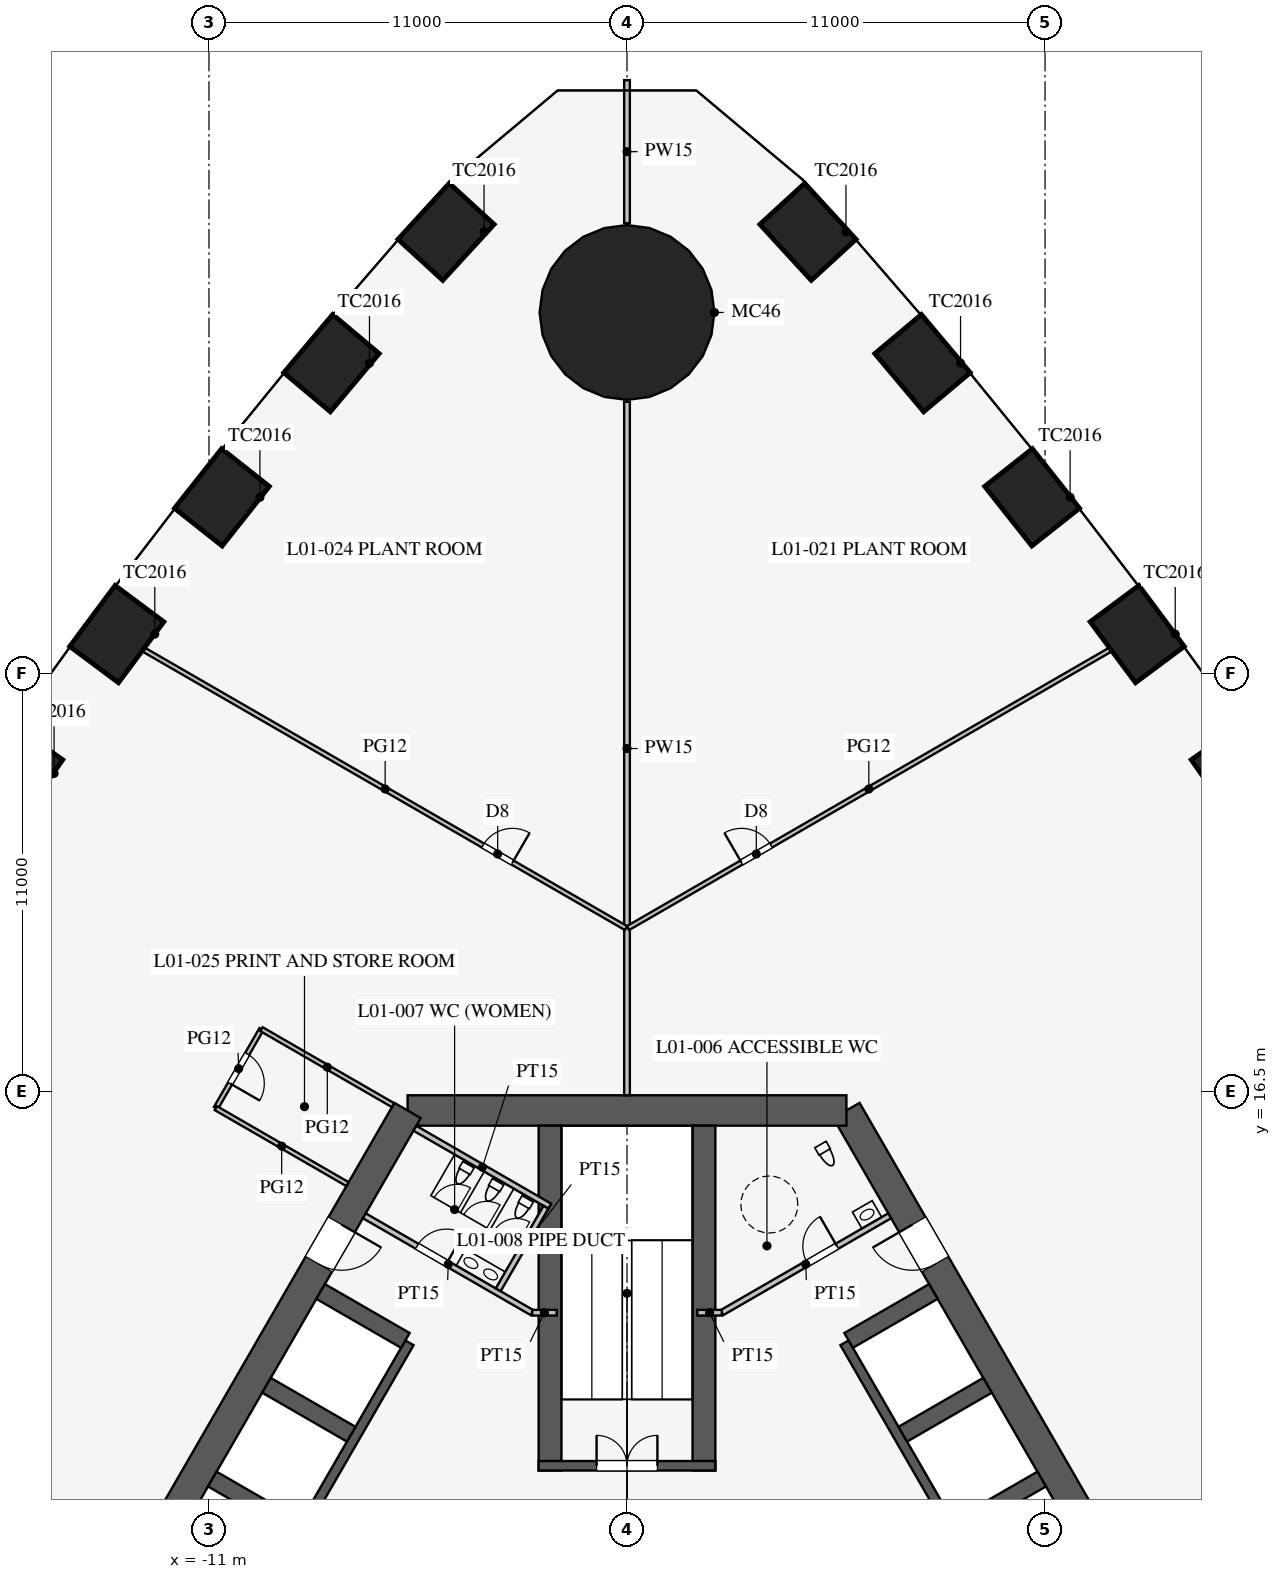
"""IFC4 building model, lengths in metres.
Left out: names, types, materials, properties, quantities, classifications, styles, units other than length and angle.
Written with IfcOpenShell. Run it as: python <this file> out.ifc"""

import sys

from ifc_helpers import new_model, si_unit, direction, frame, frame_2d, origin, origin_2d, place, context, subcontext, project, spatial, rectangle, circle, extrude, element, fill, save


model = new_model("IFC4")
c1 = context("Model", 3, precision=1e-05, world=origin(), true_north=direction((0.0, 1.0)))
c2 = subcontext(c1, "Body", "Model", "MODEL_VIEW")
j1 = project(units=[si_unit("LENGTHUNIT", "METRE"), si_unit("PLANEANGLEUNIT", "RADIAN")], contexts=[c1])
p1 = place(None, origin())
s1 = spatial("IfcSite", under=j1, at=p1, CompositionType="ELEMENT")
p2 = place(p1, origin())
s2 = spatial("IfcBuilding", under=s1, at=p2, CompositionType="ELEMENT")
p3 = place(p2, frame((0.0, 0.0, 6.5)))
s3 = spatial("IfcBuildingStorey", under=s2, at=p3, CompositionType="ELEMENT", Elevation=6.5)
for number, where, z_axis, x_axis in (
    (1, (16.076, 24.87, 0.0), (0.0, 0.0, 1.0), (-0.574, 0.819, 0.0)),
    (2, (13.426, 28.536, 0.0), (0.0, 0.0, 1.0), (-0.597, 0.802, 0.0)),
    (3, (10.66, 32.135, 0.0), (0.0, 0.0, 1.0), (-0.62, 0.784, 0.0)),
    (4, (7.776, 35.667, 0.0), (0.0, 0.0, 1.0), (-0.643, 0.766, 0.0)),
    (5, (4.762, 39.122, 0.0), (0.0, 0.0, 1.0), (-0.676, 0.737, 0.0)),
    (6, (-4.762, 39.122, 0.0), (0.0, 0.0, 1.0), (-0.676, -0.737, 0.0)),
    (7, (-7.776, 35.667, 0.0), (0.0, 0.0, 1.0), (-0.643, -0.766, 0.0)),
    (8, (-10.66, 32.135, 0.0), (0.0, 0.0, 1.0), (-0.62, -0.784, 0.0)),
    (9, (-13.426, 28.536, 0.0), (0.0, 0.0, 1.0), (-0.597, -0.802, 0.0)),
    (10, (-16.076, 24.87, 0.0), (0.0, 0.0, 1.0), (-0.574, -0.819, 0.0)),
):
    element("IfcColumn", number, at=place(p3, frame(where, z_axis=z_axis, x_axis=x_axis)), inside=s3, PredefinedType="COLUMN", context=c2, shape_type="SweptSolid", body=[
        extrude(rectangle(XDim=2.0, YDim=1.6, at=origin_2d()), origin(), (0.0, 0.0, 1.0), 5.0),
    ])
p4 = place(p3, frame((0.0, 37.0, 0.0), z_axis=(0.0, 0.0, 1.0), x_axis=(1.0, 0.0, 0.0)))
e11 = element("IfcColumn", 11, at=p4, inside=s3, PredefinedType="COLUMN", context=c2, shape_type="SweptSolid", body=[
    extrude(circle(Radius=2.3, at=origin_2d()), origin(), (0.0, 0.0, 1.0), 5.0),
])
p5 = place(p3, frame((16.743, -3.0, 0.0), z_axis=(0.0, 0.0, 1.0), x_axis=(-0.500002442456, 0.866023993627, 0.0)))
e12 = element("IfcWall", 12, at=p5, inside=s3, PredefinedType="SHEAR", context=c2, shape_type="SweptSolid", body=[
    extrude(rectangle(XDim=21.939, YDim=0.8, at=frame_2d((10.97, 0.0))), origin(), (0.0, 0.0, 1.0), 5.0),
])
p6 = place(p5, frame((17.27, 0.0, 0.0)))
e13 = element("IfcOpeningElement", 13, at=p6, cuts=e12, PredefinedType="OPENING", context=c2, shape_type="SweptSolid", body=[
    extrude(rectangle(XDim=1.2, YDim=2.1, at=frame_2d((0.6, 1.05))), frame((0.0, 0.41, 0.0), z_axis=(0.0, -1.0, 0.0), x_axis=(1.0, 0.0, 0.0)), (0.0, 0.0, 1.0), 0.82),
])
p7 = place(p5, frame((3.47, 0.0, 0.0)))
e14 = element("IfcOpeningElement", 14, at=p7, cuts=e12, PredefinedType="OPENING", context=c2, shape_type="SweptSolid", body=[
    extrude(rectangle(XDim=1.2, YDim=2.1, at=frame_2d((0.6, 1.05))), frame((0.0, 0.41, 0.0), z_axis=(0.0, -1.0, 0.0), x_axis=(1.0, 0.0, 0.0)), (0.0, 0.0, 1.0), 0.82),
])
p8 = place(p3, frame((5.773, 16.0, 0.0), z_axis=(0.0, 0.0, 1.0), x_axis=(-1.0, 0.0, 0.0)))
e15 = element("IfcWall", 15, at=p8, inside=s3, PredefinedType="SHEAR", context=c2, shape_type="SweptSolid", body=[
    extrude(rectangle(XDim=11.547, YDim=0.8, at=frame_2d((5.773, 0.0))), origin(), (0.0, 0.0, 1.0), 5.0),
])
p9 = place(p3, frame((-5.773, 16.0, 0.0), z_axis=(0.0, 0.0, 1.0), x_axis=(-0.500002442456, -0.866023993627, 0.0)))
e16 = element("IfcWall", 16, at=p9, inside=s3, PredefinedType="SHEAR", context=c2, shape_type="SweptSolid", body=[
    extrude(rectangle(XDim=21.939, YDim=0.8, at=frame_2d((10.97, 0.0))), origin(), (0.0, 0.0, 1.0), 5.0),
])
p10 = place(p9, frame((17.27, 0.0, 0.0)))
e17 = element("IfcOpeningElement", 17, at=p10, cuts=e16, PredefinedType="OPENING", context=c2, shape_type="SweptSolid", body=[
    extrude(rectangle(XDim=1.2, YDim=2.1, at=frame_2d((0.6, 1.05))), frame((0.0, 0.41, 0.0), z_axis=(0.0, -1.0, 0.0), x_axis=(1.0, 0.0, 0.0)), (0.0, 0.0, 1.0), 0.82),
])
p11 = place(p9, frame((3.47, 0.0, 0.0)))
e18 = element("IfcOpeningElement", 18, at=p11, cuts=e16, PredefinedType="OPENING", context=c2, shape_type="SweptSolid", body=[
    extrude(rectangle(XDim=1.2, YDim=2.1, at=frame_2d((0.6, 1.05))), frame((0.0, 0.41, 0.0), z_axis=(0.0, -1.0, 0.0), x_axis=(1.0, 0.0, 0.0)), (0.0, 0.0, 1.0), 0.82),
])
p12 = place(p3, frame((11.424, 0.014, 0.0), z_axis=(0.0, 0.0, 1.0), x_axis=(-0.500001763848, 0.866024385424, 0.0)))
e19 = element("IfcWall", 19, at=p12, inside=s3, PredefinedType="SHEAR", context=c2, shape_type="SweptSolid", body=[
    extrude(rectangle(XDim=11.4, YDim=0.25, at=frame_2d((5.7, 0.0))), origin(), (0.0, 0.0, 1.0), 5.0),
])
for number, where, z_axis, x_axis in (
    (20, (8.682, 5.012, 0.0), (0.0, 0.0, 1.0), (0.866, 0.5, 0.0)),
    (21, (7.257, 7.481, 0.0), (0.0, 0.0, 1.0), (0.866, 0.5, 0.0)),
):
    element("IfcWall", number, at=place(p3, frame(where, z_axis=z_axis, x_axis=x_axis)), inside=s3, PredefinedType="SHEAR", context=c2, shape_type="SweptSolid", body=[
        extrude(rectangle(XDim=2.575, YDim=0.45, at=frame_2d((1.288, 0.0))), origin(), (0.0, 0.0, 1.0), 5.0),
    ])
p13 = place(p3, frame((5.832, 9.949, 0.0), z_axis=(0.0, 0.0, 1.0), x_axis=(0.866029291668, 0.499993265928, 0.0)))
e22 = element("IfcWall", 22, at=p13, inside=s3, PredefinedType="SHEAR", context=c2, shape_type="SweptSolid", body=[
    extrude(rectangle(XDim=2.575, YDim=0.45, at=frame_2d((1.288, 0.0))), origin(), (0.0, 0.0, 1.0), 5.0),
])
p14 = place(p3, frame((-5.724, 9.886, 0.0), z_axis=(0.0, 0.0, 1.0), x_axis=(-0.500001763848, -0.866024385424, 0.0)))
e23 = element("IfcWall", 23, at=p14, inside=s3, PredefinedType="SHEAR", context=c2, shape_type="SweptSolid", body=[
    extrude(rectangle(XDim=11.4, YDim=0.25, at=frame_2d((5.7, 0.0))), origin(), (0.0, 0.0, 1.0), 5.0),
])
p15 = place(p14, frame((6.525, 0.0, 0.0)))
e24 = element("IfcOpeningElement", 24, at=p15, cuts=e23, PredefinedType="OPENING", context=c2, shape_type="SweptSolid", body=[
    extrude(rectangle(XDim=1.2, YDim=2.2, at=frame_2d((0.6, 1.1))), frame((0.0, 0.135, 0.0), z_axis=(0.0, -1.0, 0.0), x_axis=(1.0, 0.0, 0.0)), (0.0, 0.0, 1.0), 0.27),
])
p16 = place(p14, frame((9.375, 0.0, 0.0)))
e25 = element("IfcOpeningElement", 25, at=p16, cuts=e23, PredefinedType="OPENING", context=c2, shape_type="SweptSolid", body=[
    extrude(rectangle(XDim=1.2, YDim=2.2, at=frame_2d((0.6, 1.1))), frame((0.0, 0.135, 0.0), z_axis=(0.0, -1.0, 0.0), x_axis=(1.0, 0.0, 0.0)), (0.0, 0.0, 1.0), 0.27),
])
p17 = place(p3, frame((-5.832, 9.949, 0.0), z_axis=(0.0, 0.0, 1.0), x_axis=(-0.866029291668, 0.499993265928, 0.0)))
e26 = element("IfcWall", 26, at=p17, inside=s3, PredefinedType="SHEAR", context=c2, shape_type="SweptSolid", body=[
    extrude(rectangle(XDim=2.575, YDim=0.45, at=frame_2d((1.288, 0.0))), origin(), (0.0, 0.0, 1.0), 5.0),
])
for number, where, z_axis, x_axis in (
    (27, (-7.257, 7.481, 0.0), (0.0, 0.0, 1.0), (-0.866, 0.5, 0.0)),
    (28, (-8.682, 5.012, 0.0), (0.0, 0.0, 1.0), (-0.866, 0.5, 0.0)),
):
    element("IfcWall", number, at=place(p3, frame(where, z_axis=z_axis, x_axis=x_axis)), inside=s3, PredefinedType="SHEAR", context=c2, shape_type="SweptSolid", body=[
        extrude(rectangle(XDim=2.575, YDim=0.45, at=frame_2d((1.288, 0.0))), origin(), (0.0, 0.0, 1.0), 5.0),
    ])
for number, where, z_axis, x_axis in (
    (29, (2.025, 6.525, 0.0), (0.0, 0.0, 1.0), (0.0, 1.0, 0.0)),
    (30, (-2.025, 6.525, 0.0), (0.0, 0.0, 1.0), (0.0, 1.0, 0.0)),
):
    element("IfcWall", number, at=place(p3, frame(where, z_axis=z_axis, x_axis=x_axis)), inside=s3, PredefinedType="SHEAR", context=c2, shape_type="SweptSolid", body=[
        extrude(rectangle(XDim=9.075, YDim=0.6, at=frame_2d((4.538, 0.0))), origin(), (0.0, 0.0, 1.0), 5.0),
    ])
p18 = place(p3, frame((2.325, 6.65, 0.0), z_axis=(0.0, 0.0, 1.0), x_axis=(-1.0, 0.0, 0.0)))
e31 = element("IfcWall", 31, at=p18, inside=s3, PredefinedType="SHEAR", context=c2, shape_type="SweptSolid", body=[
    extrude(rectangle(XDim=4.65, YDim=0.25, at=frame_2d((2.325, 0.0))), origin(), (0.0, 0.0, 1.0), 5.0),
])
p19 = place(p18, frame((1.525, 0.0, 0.0)))
e32 = element("IfcOpeningElement", 32, at=p19, cuts=e31, PredefinedType="OPENING", context=c2, shape_type="SweptSolid", body=[
    extrude(rectangle(XDim=1.6, YDim=2.1, at=frame_2d((0.8, 1.05))), frame((0.0, 0.135, 0.0), z_axis=(0.0, -1.0, 0.0), x_axis=(1.0, 0.0, 0.0)), (0.0, 0.0, 1.0), 0.27),
])
p20 = place(p3, frame((2.495, 10.678, 0.0), z_axis=(0.0, 0.0, 1.0), x_axis=(0.86602216432, 0.500005610874, 0.0)))
e33 = element("IfcWall", 33, at=p20, inside=s3, PredefinedType="PARTITIONING", context=c2, shape_type="SweptSolid", body=[
    extrude(rectangle(XDim=5.1, YDim=0.15, at=frame_2d((2.55, 0.0))), origin(), (0.0, 0.0, 1.0), 4.8),
])
p21 = place(p20, frame((2.6, 0.0, 0.0)))
e34 = element("IfcOpeningElement", 34, at=p21, cuts=e33, PredefinedType="OPENING", context=c2, shape_type="SweptSolid", body=[
    extrude(rectangle(XDim=0.9, YDim=2.1, at=frame_2d((0.45, 1.05))), frame((0.0, 0.085, 0.0), z_axis=(0.0, -1.0, 0.0), x_axis=(1.0, 0.0, 0.0)), (0.0, 0.0, 1.0), 0.17),
])
p22 = place(p3, frame((-2.495, 10.678, 0.0), z_axis=(0.0, 0.0, 1.0), x_axis=(-0.86602216432, 0.500005610874, 0.0)))
e35 = element("IfcWall", 35, at=p22, inside=s3, PredefinedType="PARTITIONING", context=c2, shape_type="SweptSolid", body=[
    extrude(rectangle(XDim=5.1, YDim=0.15, at=frame_2d((2.55, 0.0))), origin(), (0.0, 0.0, 1.0), 4.8),
])
p23 = place(p22, frame((2.6, 0.0, 0.0)))
e36 = element("IfcOpeningElement", 36, at=p23, cuts=e35, PredefinedType="OPENING", context=c2, shape_type="SweptSolid", body=[
    extrude(rectangle(XDim=0.9, YDim=2.1, at=frame_2d((0.45, 1.05))), frame((0.0, 0.085, 0.0), z_axis=(0.0, -1.0, 0.0), x_axis=(1.0, 0.0, 0.0)), (0.0, 0.0, 1.0), 0.17),
])
for number, where, z_axis, x_axis in (
    (37, (2.495, 10.678, 0.0), (0.0, 0.0, 1.0), (-1.0, 0.0, 0.0)),
    (38, (-2.495, 10.678, 0.0), (0.0, 0.0, 1.0), (1.0, 0.0, 0.0)),
):
    element("IfcWall", number, at=place(p3, frame(where, z_axis=z_axis, x_axis=x_axis)), inside=s3, PredefinedType="PARTITIONING", context=c2, shape_type="SweptSolid", body=[
        extrude(rectangle(XDim=0.645, YDim=0.15, at=frame_2d((0.323, 0.0))), origin(), (0.0, 0.0, 1.0), 4.8),
    ])
p24 = place(p3, frame((-2.031, 13.482, 0.0), z_axis=(0.0, 0.0, 1.0), x_axis=(-0.866050731258, 0.499956128963, 0.0)))
e39 = element("IfcWall", 39, at=p24, inside=s3, PredefinedType="PARTITIONING", context=c2, shape_type="SweptSolid", body=[
    extrude(rectangle(XDim=4.1, YDim=0.15, at=frame_2d((2.05, 0.0))), origin(), (0.0, 0.0, 1.0), 4.8),
])
p25 = place(p3, frame((-3.389, 11.281, 0.0), z_axis=(0.0, 0.0, 1.0), x_axis=(0.499989096993, 0.866031698547, 0.0)))
e40 = element("IfcWall", 40, at=p25, inside=s3, PredefinedType="PARTITIONING", context=c2, shape_type="SweptSolid", body=[
    extrude(rectangle(XDim=2.51, YDim=0.15, at=frame_2d((1.255, 0.0))), origin(), (0.0, 0.0, 1.0), 4.8),
])
p26 = place(p3, frame((0.0, 16.4, 0.0), z_axis=(0.0, 0.0, 1.0), x_axis=(0.0, 1.0, 0.0)))
e41 = element("IfcWall", 41, at=p26, inside=s3, PredefinedType="PARTITIONING", context=c2, shape_type="SweptSolid", body=[
    extrude(rectangle(XDim=18.25, YDim=0.15, at=frame_2d((9.125, 0.0))), origin(), (0.0, 0.0, 1.0), 3.1),
])
p27 = place(p3, frame((0.0, 39.35, 0.0), z_axis=(0.0, 0.0, 1.0), x_axis=(0.0, 1.0, 0.0)))
e42 = element("IfcWall", 42, at=p27, inside=s3, PredefinedType="PARTITIONING", context=c2, shape_type="SweptSolid", body=[
    extrude(rectangle(XDim=3.764, YDim=0.15, at=frame_2d((1.882, 0.0))), origin(), (0.0, 0.0, 1.0), 3.1),
])
p28 = place(p3, frame((0.025, 20.799, 0.0), z_axis=(0.0, 0.0, 1.0), x_axis=(0.866024773507, 0.50000109167, 0.0)))
e43 = element("IfcWall", 43, at=p28, inside=s3, PredefinedType="PARTITIONING", context=c2, shape_type="SweptSolid", body=[
    extrude(rectangle(XDim=14.638, YDim=0.12, at=frame_2d((7.319, 0.0))), origin(), (0.0, 0.0, 1.0), 3.6),
])
p29 = place(p28, frame((3.45, 0.0, 0.0)))
e44 = element("IfcOpeningElement", 44, at=p29, cuts=e43, PredefinedType="OPENING", context=c2, shape_type="SweptSolid", body=[
    extrude(rectangle(XDim=0.9, YDim=2.1, at=frame_2d((0.45, 1.05))), frame((0.0, 0.07, 0.0), z_axis=(0.0, -1.0, 0.0), x_axis=(1.0, 0.0, 0.0)), (0.0, 0.0, 1.0), 0.14),
])
p30 = place(p3, frame((-9.619, 18.14, 0.0), z_axis=(0.0, 0.0, 1.0), x_axis=(-0.500001309137, -0.866024647952, 0.0)))
e45 = element("IfcWall", 45, at=p30, inside=s3, PredefinedType="PARTITIONING", context=c2, shape_type="SweptSolid", body=[
    extrude(rectangle(XDim=2.4, YDim=0.12, at=frame_2d((1.2, 0.0))), origin(), (0.0, 0.0, 1.0), 3.6),
])
p31 = place(p30, frame((0.75, 0.0, 0.0)))
e46 = element("IfcOpeningElement", 46, at=p31, cuts=e45, PredefinedType="OPENING", context=c2, shape_type="SweptSolid", body=[
    extrude(rectangle(XDim=0.9, YDim=2.1, at=frame_2d((0.45, 1.05))), frame((0.0, 0.07, 0.0), z_axis=(0.0, -1.0, 0.0), x_axis=(1.0, 0.0, 0.0)), (0.0, 0.0, 1.0), 0.14),
])
for number, where, z_axis, x_axis in (
    (47, (-6.155, 16.14, 0.0), (0.0, 0.0, 1.0), (-0.866, 0.5, 0.0)),
    (48, (-7.355, 14.061, 0.0), (0.0, 0.0, 1.0), (-0.866, 0.5, 0.0)),
):
    element("IfcWall", number, at=place(p3, frame(where, z_axis=z_axis, x_axis=x_axis)), inside=s3, PredefinedType="PARTITIONING", context=c2, shape_type="SweptSolid", body=[
        extrude(rectangle(XDim=4.0, YDim=0.12, at=frame_2d((2.0, 0.0))), origin(), (0.0, 0.0, 1.0), 3.6),
    ])
p32 = place(p3, frame((-0.025, 20.799, 0.0), z_axis=(0.0, 0.0, 1.0), x_axis=(-0.866024773507, 0.50000109167, 0.0)))
e49 = element("IfcWall", 49, at=p32, inside=s3, PredefinedType="PARTITIONING", context=c2, shape_type="SweptSolid", body=[
    extrude(rectangle(XDim=14.638, YDim=0.12, at=frame_2d((7.319, 0.0))), origin(), (0.0, 0.0, 1.0), 3.6),
])
p33 = place(p32, frame((3.45, 0.0, 0.0)))
e50 = element("IfcOpeningElement", 50, at=p33, cuts=e49, PredefinedType="OPENING", context=c2, shape_type="SweptSolid", body=[
    extrude(rectangle(XDim=0.9, YDim=2.1, at=frame_2d((0.45, 1.05))), frame((0.0, 0.07, 0.0), z_axis=(0.0, -1.0, 0.0), x_axis=(1.0, 0.0, 0.0)), (0.0, 0.0, 1.0), 0.14),
])
p34 = place(p21, origin())
e51 = element("IfcDoor", 51, at=p34, inside=s3, OperationType="SINGLE_SWING_RIGHT", PredefinedType="DOOR", context=c2, shape_type="SweptSolid", body=[
    extrude(rectangle(XDim=0.9, YDim=2.1, at=frame_2d((0.45, 1.05))), frame((0.0, 0.025, 0.0), z_axis=(0.0, -1.0, 0.0), x_axis=(1.0, 0.0, 0.0)), (0.0, 0.0, 1.0), 0.05),
])
fill(e34, e51)
p35 = place(p23, frame((0.9, 0.0, 0.0), z_axis=(0.0, 0.0, 1.0), x_axis=(-1.0, 0.0, 0.0)))
e52 = element("IfcDoor", 52, at=p35, inside=s3, OperationType="SINGLE_SWING_RIGHT", PredefinedType="DOOR", context=c2, shape_type="SweptSolid", body=[
    extrude(rectangle(XDim=0.9, YDim=2.1, at=frame_2d((0.45, 1.05))), frame((0.0, 0.025, 0.0), z_axis=(0.0, -1.0, 0.0), x_axis=(1.0, 0.0, 0.0)), (0.0, 0.0, 1.0), 0.05),
])
fill(e36, e52)
p36 = place(p19, frame((1.6, 0.0, 0.0), z_axis=(0.0, 0.0, 1.0), x_axis=(-1.0, 0.0, 0.0)))
e53 = element("IfcDoor", 53, at=p36, inside=s3, OperationType="DOUBLE_DOOR_SINGLE_SWING", PredefinedType="DOOR", context=c2, shape_type="SweptSolid", body=[
    extrude(rectangle(XDim=1.6, YDim=2.1, at=frame_2d((0.8, 1.05))), frame((0.0, 0.025, 0.0), z_axis=(0.0, -1.0, 0.0), x_axis=(1.0, 0.0, 0.0)), (0.0, 0.0, 1.0), 0.05),
])
fill(e32, e53)
p37 = place(p6, origin())
e54 = element("IfcDoor", 54, at=p37, inside=s3, OperationType="SINGLE_SWING_RIGHT", PredefinedType="DOOR", context=c2, shape_type="SweptSolid", body=[
    extrude(rectangle(XDim=1.2, YDim=2.1, at=frame_2d((0.6, 1.05))), frame((0.0, 0.025, 0.0), z_axis=(0.0, -1.0, 0.0), x_axis=(1.0, 0.0, 0.0)), (0.0, 0.0, 1.0), 0.05),
])
fill(e13, e54)
p38 = place(p11, origin())
e55 = element("IfcDoor", 55, at=p38, inside=s3, OperationType="SINGLE_SWING_LEFT", PredefinedType="DOOR", context=c2, shape_type="SweptSolid", body=[
    extrude(rectangle(XDim=1.2, YDim=2.1, at=frame_2d((0.6, 1.05))), frame((0.0, 0.025, 0.0), z_axis=(0.0, -1.0, 0.0), x_axis=(1.0, 0.0, 0.0)), (0.0, 0.0, 1.0), 0.05),
])
fill(e18, e55)
p39 = place(p29, origin())
e56 = element("IfcDoor", 56, at=p39, inside=s3, OperationType="SINGLE_SWING_LEFT", PredefinedType="DOOR", context=c2, shape_type="SweptSolid", body=[
    extrude(rectangle(XDim=0.9, YDim=2.1, at=frame_2d((0.45, 1.05))), frame((0.0, 0.025, 0.0), z_axis=(0.0, -1.0, 0.0), x_axis=(1.0, 0.0, 0.0)), (0.0, 0.0, 1.0), 0.05),
])
fill(e44, e56)
p40 = place(p33, frame((0.9, 0.0, 0.0), z_axis=(0.0, 0.0, 1.0), x_axis=(-1.0, 0.0, 0.0)))
e57 = element("IfcDoor", 57, at=p40, inside=s3, OperationType="SINGLE_SWING_RIGHT", PredefinedType="DOOR", context=c2, shape_type="SweptSolid", body=[
    extrude(rectangle(XDim=0.9, YDim=2.1, at=frame_2d((0.45, 1.05))), frame((0.0, 0.025, 0.0), z_axis=(0.0, -1.0, 0.0), x_axis=(1.0, 0.0, 0.0)), (0.0, 0.0, 1.0), 0.05),
])
fill(e50, e57)
p41 = place(p31, origin())
e58 = element("IfcDoor", 58, at=p41, inside=s3, OperationType="SINGLE_SWING_RIGHT", PredefinedType="DOOR", context=c2, shape_type="SweptSolid", body=[
    extrude(rectangle(XDim=0.9, YDim=2.1, at=frame_2d((0.45, 1.05))), frame((0.0, 0.025, 0.0), z_axis=(0.0, -1.0, 0.0), x_axis=(1.0, 0.0, 0.0)), (0.0, 0.0, 1.0), 0.05),
])
fill(e46, e58)
save(model, sys.argv[1])
